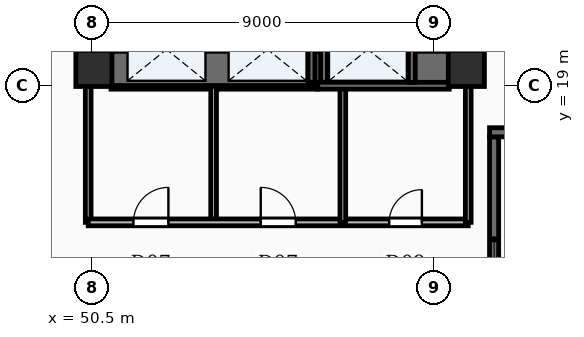
"""IFC4 building model, lengths in metres.
Left out: names, types, materials, properties, quantities, classifications, styles, units other than length and angle.
Written with IfcOpenShell. Run it as: python <this file> out.ifc"""

import sys

from ifc_helpers import new_model, si_unit, direction, frame, frame_2d, origin, origin_2d, place, context, subcontext, project, spatial, rectangle, extrude, element, fill, save


model = new_model("IFC4")
c1 = context("Model", 3, precision=1e-05, world=origin(), true_north=direction((0.0, 1.0)))
c2 = subcontext(c1, "Body", "Model", "MODEL_VIEW")
j1 = project(units=[si_unit("LENGTHUNIT", "METRE"), si_unit("PLANEANGLEUNIT", "RADIAN")], contexts=[c1])
p1 = place(None, origin())
s1 = spatial("IfcSite", under=j1, at=p1, CompositionType="ELEMENT")
p2 = place(p1, origin())
s2 = spatial("IfcBuilding", under=s1, at=p2, CompositionType="ELEMENT")
p3 = place(p2, origin())
s3 = spatial("IfcBuildingStorey", under=s2, at=p3, CompositionType="ELEMENT", Elevation=0.0)
p4 = place(p3, frame((50.55, 19.0, -0.45), z_axis=(0.0, 0.0, 1.0), x_axis=(0.0, 1.0, 0.0)))
e1 = element("IfcWall", 1, at=p4, inside=s3, PredefinedType="SHEAR", context=c2, shape_type="SweptSolid", body=[
    extrude(rectangle(XDim=20.8, YDim=0.9, at=frame_2d((10.4, 0.0))), origin(), (0.0, 0.0, 1.0), 8.1),
])
p5 = place(p4, frame((2.5, 0.0, 0.45)))
e2 = element("IfcOpeningElement", 2, at=p5, cuts=e1, PredefinedType="OPENING", context=c2, shape_type="SweptSolid", body=[
    extrude(rectangle(XDim=1.05, YDim=2.15, at=frame_2d((0.525, 1.075))), frame((0.0, 0.46, 0.0), z_axis=(0.0, -1.0, 0.0), x_axis=(1.0, 0.0, 0.0)), (0.0, 0.0, 1.0), 0.92),
])
p6 = place(p4, frame((8.65, 0.0, 0.45)))
e3 = element("IfcOpeningElement", 3, at=p6, cuts=e1, PredefinedType="OPENING", context=c2, shape_type="SweptSolid", body=[
    extrude(rectangle(XDim=1.05, YDim=2.15, at=frame_2d((0.525, 1.075))), frame((0.0, 0.46, 0.0), z_axis=(0.0, -1.0, 0.0), x_axis=(1.0, 0.0, 0.0)), (0.0, 0.0, 1.0), 0.92),
])
p7 = place(p4, frame((14.62, 0.0, 0.45)))
e4 = element("IfcOpeningElement", 4, at=p7, cuts=e1, PredefinedType="OPENING", context=c2, shape_type="SweptSolid", body=[
    extrude(rectangle(XDim=1.1, YDim=2.15, at=frame_2d((0.55, 1.075))), frame((0.0, 0.46, 0.0), z_axis=(0.0, -1.0, 0.0), x_axis=(1.0, 0.0, 0.0)), (0.0, 0.0, 1.0), 0.92),
])
p8 = place(p3, frame((60.35, 19.0, -0.45), z_axis=(0.0, 0.0, 1.0), x_axis=(0.0, 1.0, 0.0)))
e5 = element("IfcWall", 5, at=p8, inside=s3, PredefinedType="SHEAR", context=c2, shape_type="SweptSolid", body=[
    extrude(rectangle(XDim=20.8, YDim=0.9, at=frame_2d((10.4, 0.0))), origin(), (0.0, 0.0, 1.0), 8.1),
])
p9 = place(p3, frame((51.0, 19.45, -0.45), z_axis=(0.0, 0.0, 1.0), x_axis=(1.0, 0.0, 0.0)))
e6 = element("IfcWall", 6, at=p9, inside=s3, PredefinedType="SHEAR", context=c2, shape_type="SweptSolid", body=[
    extrude(rectangle(XDim=8.9, YDim=0.9, at=frame_2d((4.45, 0.0))), origin(), (0.0, 0.0, 1.0), 8.1),
])
for number, where, z_axis, x_axis in (
    (7, (50.55, 19.45, -0.45), (0.0, 0.0, 1.0), (1.0, 0.0, 0.0)),
    (8, (60.35, 19.45, -0.45), (0.0, 0.0, 1.0), (1.0, 0.0, 0.0)),
):
    element("IfcColumn", number, at=place(p3, frame(where, z_axis=z_axis, x_axis=x_axis)), inside=s3, PredefinedType="COLUMN", context=c2, shape_type="SweptSolid", body=[
        extrude(rectangle(XDim=0.95, YDim=0.95, at=origin_2d()), origin(), (0.0, 0.0, 1.0), 8.1),
    ])
p10 = place(p3, frame((60.96, 17.77, 0.0), z_axis=(0.0, 0.0, 1.0), x_axis=(1.0, 0.0, 0.0)))
e9 = element("IfcWall", 9, at=p10, inside=s3, PredefinedType="SOLIDWALL", context=c2, shape_type="SweptSolid", body=[
    extrude(rectangle(XDim=9.88, YDim=0.24, at=frame_2d((4.94, 0.0))), origin(), (0.0, 0.0, 1.0), 7.65),
])
p11 = place(p10, frame((0.69, 0.0, 0.0)))
e10 = element("IfcOpeningElement", 10, at=p11, cuts=e9, PredefinedType="OPENING", context=c2, shape_type="SweptSolid", body=[
    extrude(rectangle(XDim=1.1, YDim=2.15, at=frame_2d((0.55, 1.075))), frame((0.0, 0.13, 0.0), z_axis=(0.0, -1.0, 0.0), x_axis=(1.0, 0.0, 0.0)), (0.0, 0.0, 1.0), 0.26),
])
p12 = place(p3, frame((61.08, 13.5, 0.0), z_axis=(0.0, 0.0, 1.0), x_axis=(0.0, 1.0, 0.0)))
e11 = element("IfcWall", 11, at=p12, inside=s3, PredefinedType="SOLIDWALL", context=c2, shape_type="SweptSolid", body=[
    extrude(rectangle(XDim=4.15, YDim=0.24, at=frame_2d((2.075, 0.0))), origin(), (0.0, 0.0, 1.0), 7.65),
])
p13 = place(p3, frame((51.0, 18.995, 0.0), z_axis=(0.0, 0.0, 1.0), x_axis=(1.0, 0.0, 0.0)))
e12 = element("IfcWall", 12, at=p13, inside=s3, PredefinedType="SOLIDWALL", context=c2, shape_type="SweptSolid", body=[
    extrude(rectangle(XDim=2.79, YDim=0.18, at=frame_2d((1.395, 0.0))), origin(), (0.0, 0.0, 1.0), 7.65),
])
for number, where, z_axis, x_axis in (
    (13, (51.305, 19.085, 0.0), (0.0, 0.0, 1.0), (0.0, 1.0, 0.0)),
    (14, (53.615, 19.085, 0.0), (0.0, 0.0, 1.0), (0.0, 1.0, 0.0)),
):
    element("IfcWall", number, at=place(p3, frame(where, z_axis=z_axis, x_axis=x_axis)), inside=s3, PredefinedType="SOLIDWALL", context=c2, shape_type="SweptSolid", body=[
        extrude(rectangle(XDim=1.73, YDim=0.18, at=frame_2d((0.865, 0.0))), origin(), (0.0, 0.0, 1.0), 7.65),
    ])
p14 = place(p3, frame((53.79, 18.995, 0.0), z_axis=(0.0, 0.0, 1.0), x_axis=(1.0, 0.0, 0.0)))
e15 = element("IfcWall", 15, at=p14, inside=s3, PredefinedType="SOLIDWALL", context=c2, shape_type="SweptSolid", body=[
    extrude(rectangle(XDim=2.65, YDim=0.18, at=frame_2d((1.325, 0.0))), origin(), (0.0, 0.0, 1.0), 7.65),
])
for number, where, z_axis, x_axis in (
    (16, (53.965, 19.085, 0.0), (0.0, 0.0, 1.0), (0.0, 1.0, 0.0)),
    (17, (56.275, 19.085, 0.0), (0.0, 0.0, 1.0), (0.0, 1.0, 0.0)),
):
    element("IfcWall", number, at=place(p3, frame(where, z_axis=z_axis, x_axis=x_axis)), inside=s3, PredefinedType="SOLIDWALL", context=c2, shape_type="SweptSolid", body=[
        extrude(rectangle(XDim=1.73, YDim=0.18, at=frame_2d((0.865, 0.0))), origin(), (0.0, 0.0, 1.0), 7.65),
    ])
p15 = place(p3, frame((56.44, 18.995, 0.0), z_axis=(0.0, 0.0, 1.0), x_axis=(1.0, 0.0, 0.0)))
e18 = element("IfcWall", 18, at=p15, inside=s3, PredefinedType="SOLIDWALL", context=c2, shape_type="SweptSolid", body=[
    extrude(rectangle(XDim=3.46, YDim=0.18, at=frame_2d((1.73, 0.0))), origin(), (0.0, 0.0, 1.0), 7.65),
])
for number, where, z_axis, x_axis in (
    (19, (56.605, 19.085, 0.0), (0.0, 0.0, 1.0), (0.0, 1.0, 0.0)),
    (20, (58.915, 19.085, 0.0), (0.0, 0.0, 1.0), (0.0, 1.0, 0.0)),
):
    element("IfcWall", number, at=place(p3, frame(where, z_axis=z_axis, x_axis=x_axis)), inside=s3, PredefinedType="SOLIDWALL", context=c2, shape_type="SweptSolid", body=[
        extrude(rectangle(XDim=1.73, YDim=0.18, at=frame_2d((0.865, 0.0))), origin(), (0.0, 0.0, 1.0), 7.65),
    ])
for number, where, z_axis, x_axis in (
    (21, (53.7, 15.4, 0.0), (0.0, 0.0, 1.0), (0.0, 1.0, 0.0)),
    (22, (57.1, 15.4, 0.0), (0.0, 0.0, 1.0), (0.0, 1.0, 0.0)),
):
    element("IfcWall", number, at=place(p3, frame(where, z_axis=z_axis, x_axis=x_axis)), inside=s3, PredefinedType="PARTITIONING", context=c2, shape_type="SweptSolid", body=[
        extrude(rectangle(XDim=3.58, YDim=0.15, at=frame_2d((1.79, 0.0))), origin(), (0.0, 0.0, 1.0), 6.71),
    ])
p16 = place(p3, frame((50.4, 15.4, 0.0), z_axis=(0.0, 0.0, 1.0), x_axis=(1.0, 0.0, 0.0)))
e23 = element("IfcWall", 23, at=p16, inside=s3, PredefinedType="SOLIDWALL", context=c2, shape_type="SweptSolid", body=[
    extrude(rectangle(XDim=10.0, YDim=0.18, at=frame_2d((5.0, 0.0))), origin(), (0.0, 0.0, 1.0), 6.71),
])
p17 = place(p16, frame((1.19, 0.0, 0.0)))
e24 = element("IfcOpeningElement", 24, at=p17, cuts=e23, PredefinedType="OPENING", context=c2, shape_type="SweptSolid", body=[
    extrude(rectangle(XDim=0.92, YDim=2.1, at=frame_2d((0.46, 1.05))), frame((0.0, 0.1, 0.0), z_axis=(0.0, -1.0, 0.0), x_axis=(1.0, 0.0, 0.0)), (0.0, 0.0, 1.0), 0.2),
])
p18 = place(p16, frame((4.54, 0.0, 0.0)))
e25 = element("IfcOpeningElement", 25, at=p18, cuts=e23, PredefinedType="OPENING", context=c2, shape_type="SweptSolid", body=[
    extrude(rectangle(XDim=0.92, YDim=2.1, at=frame_2d((0.46, 1.05))), frame((0.0, 0.1, 0.0), z_axis=(0.0, -1.0, 0.0), x_axis=(1.0, 0.0, 0.0)), (0.0, 0.0, 1.0), 0.2),
])
p19 = place(p16, frame((7.92, 0.0, 0.0)))
e26 = element("IfcOpeningElement", 26, at=p19, cuts=e23, PredefinedType="OPENING", context=c2, shape_type="SweptSolid", body=[
    extrude(rectangle(XDim=0.86, YDim=2.05, at=frame_2d((0.43, 1.025))), frame((0.0, 0.1, 0.0), z_axis=(0.0, -1.0, 0.0), x_axis=(1.0, 0.0, 0.0)), (0.0, 0.0, 1.0), 0.2),
])
for number, where, z_axis, x_axis in (
    (27, (50.4, 15.4, 0.0), (0.0, 0.0, 1.0), (0.0, 1.0, 0.0)),
    (28, (60.4, 15.4, 0.0), (0.0, 0.0, 1.0), (0.0, 1.0, 0.0)),
):
    element("IfcWall", number, at=place(p3, frame(where, z_axis=z_axis, x_axis=x_axis)), inside=s3, PredefinedType="PARTITIONING", context=c2, shape_type="SweptSolid", body=[
        extrude(rectangle(XDim=3.58, YDim=0.15, at=frame_2d((1.79, 0.0))), origin(), (0.0, 0.0, 1.0), 6.71),
    ])
p20 = place(p17, origin())
e29 = element("IfcDoor", 29, at=p20, inside=s3, OperationType="SINGLE_SWING_RIGHT", PredefinedType="DOOR", context=c2, shape_type="SweptSolid", body=[
    extrude(rectangle(XDim=0.92, YDim=2.1, at=frame_2d((0.46, 1.05))), frame((0.0, 0.025, 0.0), z_axis=(0.0, -1.0, 0.0), x_axis=(1.0, 0.0, 0.0)), (0.0, 0.0, 1.0), 0.05),
])
fill(e24, e29)
p21 = place(p18, origin())
e30 = element("IfcDoor", 30, at=p21, inside=s3, OperationType="SINGLE_SWING_LEFT", PredefinedType="DOOR", context=c2, shape_type="SweptSolid", body=[
    extrude(rectangle(XDim=0.92, YDim=2.1, at=frame_2d((0.46, 1.05))), frame((0.0, 0.025, 0.0), z_axis=(0.0, -1.0, 0.0), x_axis=(1.0, 0.0, 0.0)), (0.0, 0.0, 1.0), 0.05),
])
fill(e25, e30)
p22 = place(p19, origin())
e31 = element("IfcDoor", 31, at=p22, inside=s3, OperationType="SINGLE_SWING_RIGHT", PredefinedType="DOOR", context=c2, shape_type="SweptSolid", body=[
    extrude(rectangle(XDim=0.86, YDim=2.05, at=frame_2d((0.43, 1.025))), frame((0.0, 0.025, 0.0), z_axis=(0.0, -1.0, 0.0), x_axis=(1.0, 0.0, 0.0)), (0.0, 0.0, 1.0), 0.05),
])
fill(e26, e31)
save(model, sys.argv[1])
